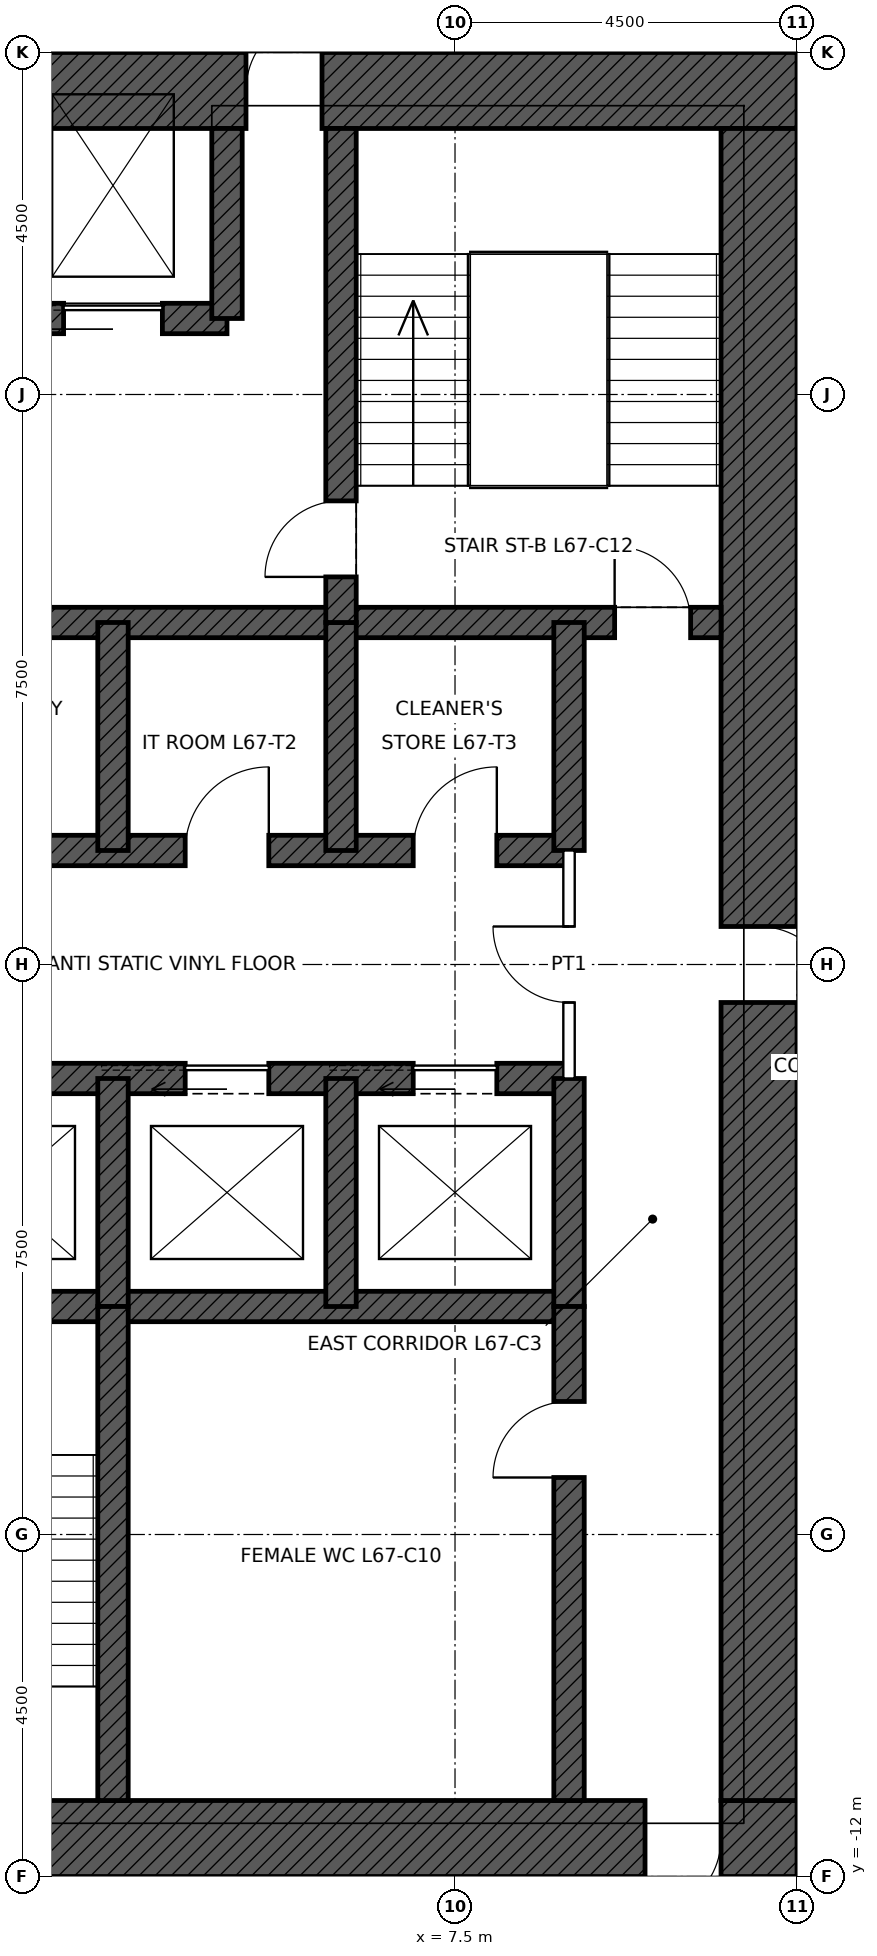
"""IFC4 building model, lengths in metres.
Left out: names, types, materials, properties, quantities, classifications, styles, units other than length and angle.
Written with IfcOpenShell. Run it as: python <this file> out.ifc"""

import sys

from ifc_helpers import new_model, si_unit, direction, frame, frame_2d, origin, place, context, subcontext, project, spatial, rectangle, extrude, element, fill, save


model = new_model("IFC4")
c1 = context("Model", 3, precision=1e-05, world=origin(), true_north=direction((0.0, 1.0)))
c2 = subcontext(c1, "Body", "Model", "MODEL_VIEW")
j1 = project(units=[si_unit("LENGTHUNIT", "METRE"), si_unit("PLANEANGLEUNIT", "RADIAN")], contexts=[c1])
p1 = place(None, origin())
s1 = spatial("IfcSite", under=j1, at=p1, CompositionType="ELEMENT")
p2 = place(p1, origin())
s2 = spatial("IfcBuilding", under=s1, at=p2, CompositionType="ELEMENT")
p3 = place(p2, frame((0.0, 0.0, 303.9)))
s3 = spatial("IfcBuildingStorey", under=s2, at=p3, CompositionType="ELEMENT", Elevation=303.9)
p4 = place(p3, frame((-12.0, 11.5, 0.0), z_axis=(0.0, 0.0, 1.0), x_axis=(1.0, 0.0, 0.0)))
e1 = element("IfcWall", 1, at=p4, inside=s3, PredefinedType="SHEAR", context=c2, shape_type="SweptSolid", body=[
    extrude(rectangle(XDim=24.0, YDim=1.0, at=frame_2d((12.0, 0.0))), origin(), (0.0, 0.0, 1.0), 4.0),
])
p5 = place(p4, frame((6.25, 0.0, 0.0)))
e2 = element("IfcOpeningElement", 2, at=p5, cuts=e1, PredefinedType="OPENING", context=c2, shape_type="SweptSolid", body=[
    extrude(rectangle(XDim=1.0, YDim=2.4, at=frame_2d((0.5, 1.2))), frame((0.0, 0.51, 0.0), z_axis=(0.0, -1.0, 0.0), x_axis=(1.0, 0.0, 0.0)), (0.0, 0.0, 1.0), 1.02),
])
p6 = place(p4, frame((16.75, 0.0, 0.0)))
e3 = element("IfcOpeningElement", 3, at=p6, cuts=e1, PredefinedType="OPENING", context=c2, shape_type="SweptSolid", body=[
    extrude(rectangle(XDim=1.0, YDim=2.4, at=frame_2d((0.5, 1.2))), frame((0.0, 0.51, 0.0), z_axis=(0.0, -1.0, 0.0), x_axis=(1.0, 0.0, 0.0)), (0.0, 0.0, 1.0), 1.02),
])
p7 = place(p3, frame((12.0, -11.5, 0.0), z_axis=(0.0, 0.0, 1.0), x_axis=(-1.0, 0.0, 0.0)))
e4 = element("IfcWall", 4, at=p7, inside=s3, PredefinedType="SHEAR", context=c2, shape_type="SweptSolid", body=[
    extrude(rectangle(XDim=24.0, YDim=1.0, at=frame_2d((12.0, 0.0))), origin(), (0.0, 0.0, 1.0), 4.0),
])
p8 = place(p7, frame((11.5, 0.0, 0.0)))
e5 = element("IfcOpeningElement", 5, at=p8, cuts=e4, PredefinedType="OPENING", context=c2, shape_type="SweptSolid", body=[
    extrude(rectangle(XDim=1.0, YDim=2.1, at=frame_2d((0.5, 1.05))), frame((0.0, 0.51, 0.0), z_axis=(0.0, -1.0, 0.0), x_axis=(1.0, 0.0, 0.0)), (0.0, 0.0, 1.0), 1.02),
])
p9 = place(p7, frame((1.0, 0.0, 0.0)))
e6 = element("IfcOpeningElement", 6, at=p9, cuts=e4, PredefinedType="OPENING", context=c2, shape_type="SweptSolid", body=[
    extrude(rectangle(XDim=1.0, YDim=2.4, at=frame_2d((0.5, 1.2))), frame((0.0, 0.51, 0.0), z_axis=(0.0, -1.0, 0.0), x_axis=(1.0, 0.0, 0.0)), (0.0, 0.0, 1.0), 1.02),
])
p10 = place(p3, frame((11.5, 11.0, 0.0), z_axis=(0.0, 0.0, 1.0), x_axis=(0.0, -1.0, 0.0)))
e7 = element("IfcWall", 7, at=p10, inside=s3, PredefinedType="SHEAR", context=c2, shape_type="SweptSolid", body=[
    extrude(rectangle(XDim=22.0, YDim=1.0, at=frame_2d((11.0, 0.0))), origin(), (0.0, 0.0, 1.0), 4.0),
])
p11 = place(p10, frame((10.5, 0.0, 0.0)))
e8 = element("IfcOpeningElement", 8, at=p11, cuts=e7, PredefinedType="OPENING", context=c2, shape_type="SweptSolid", body=[
    extrude(rectangle(XDim=1.0, YDim=2.4, at=frame_2d((0.5, 1.2))), frame((0.0, 0.51, 0.0), z_axis=(0.0, -1.0, 0.0), x_axis=(1.0, 0.0, 0.0)), (0.0, 0.0, 1.0), 1.02),
])
p12 = place(p3, frame((-11.0, 4.5, 0.0), z_axis=(0.0, 0.0, 1.0), x_axis=(1.0, 0.0, 0.0)))
e9 = element("IfcWall", 9, at=p12, inside=s3, PredefinedType="SHEAR", context=c2, shape_type="SweptSolid", body=[
    extrude(rectangle(XDim=22.0, YDim=0.4, at=frame_2d((11.0, 0.0))), origin(), (0.0, 0.0, 1.0), 4.0),
])
p13 = place(p12, frame((0.4, 0.0, 0.0)))
e10 = element("IfcOpeningElement", 10, at=p13, cuts=e9, PredefinedType="OPENING", context=c2, shape_type="SweptSolid", body=[
    extrude(rectangle(XDim=1.0, YDim=2.1, at=frame_2d((0.5, 1.05))), frame((0.0, 0.21, 0.0), z_axis=(0.0, -1.0, 0.0), x_axis=(1.0, 0.0, 0.0)), (0.0, 0.0, 1.0), 0.42),
])
p14 = place(p12, frame((20.6, 0.0, 0.0)))
e11 = element("IfcOpeningElement", 11, at=p14, cuts=e9, PredefinedType="OPENING", context=c2, shape_type="SweptSolid", body=[
    extrude(rectangle(XDim=1.0, YDim=2.1, at=frame_2d((0.5, 1.05))), frame((0.0, 0.21, 0.0), z_axis=(0.0, -1.0, 0.0), x_axis=(1.0, 0.0, 0.0)), (0.0, 0.0, 1.0), 0.42),
])
p15 = place(p3, frame((-9.0, 1.5, 0.0), z_axis=(0.0, 0.0, 1.0), x_axis=(1.0, 0.0, 0.0)))
e12 = element("IfcWall", 12, at=p15, inside=s3, PredefinedType="SHEAR", context=c2, shape_type="SweptSolid", body=[
    extrude(rectangle(XDim=18.0, YDim=0.4, at=frame_2d((9.0, 0.0))), origin(), (0.0, 0.0, 1.0), 4.0),
])
p16 = place(p15, frame((0.95, 0.0, 0.0)))
e13 = element("IfcOpeningElement", 13, at=p16, cuts=e12, PredefinedType="OPENING", context=c2, shape_type="SweptSolid", body=[
    extrude(rectangle(XDim=1.1, YDim=2.1, at=frame_2d((0.55, 1.05))), frame((0.0, 0.21, 0.0), z_axis=(0.0, -1.0, 0.0), x_axis=(1.0, 0.0, 0.0)), (0.0, 0.0, 1.0), 0.42),
])
p17 = place(p15, frame((3.95, 0.0, 0.0)))
e14 = element("IfcOpeningElement", 14, at=p17, cuts=e12, PredefinedType="OPENING", context=c2, shape_type="SweptSolid", body=[
    extrude(rectangle(XDim=1.1, YDim=2.1, at=frame_2d((0.55, 1.05))), frame((0.0, 0.21, 0.0), z_axis=(0.0, -1.0, 0.0), x_axis=(1.0, 0.0, 0.0)), (0.0, 0.0, 1.0), 0.42),
])
p18 = place(p15, frame((6.95, 0.0, 0.0)))
e15 = element("IfcOpeningElement", 15, at=p18, cuts=e12, PredefinedType="OPENING", context=c2, shape_type="SweptSolid", body=[
    extrude(rectangle(XDim=1.1, YDim=2.1, at=frame_2d((0.55, 1.05))), frame((0.0, 0.21, 0.0), z_axis=(0.0, -1.0, 0.0), x_axis=(1.0, 0.0, 0.0)), (0.0, 0.0, 1.0), 0.42),
])
p19 = place(p15, frame((9.95, 0.0, 0.0)))
e16 = element("IfcOpeningElement", 16, at=p19, cuts=e12, PredefinedType="OPENING", context=c2, shape_type="SweptSolid", body=[
    extrude(rectangle(XDim=1.1, YDim=2.1, at=frame_2d((0.55, 1.05))), frame((0.0, 0.21, 0.0), z_axis=(0.0, -1.0, 0.0), x_axis=(1.0, 0.0, 0.0)), (0.0, 0.0, 1.0), 0.42),
])
p20 = place(p15, frame((12.95, 0.0, 0.0)))
e17 = element("IfcOpeningElement", 17, at=p20, cuts=e12, PredefinedType="OPENING", context=c2, shape_type="SweptSolid", body=[
    extrude(rectangle(XDim=1.1, YDim=2.1, at=frame_2d((0.55, 1.05))), frame((0.0, 0.21, 0.0), z_axis=(0.0, -1.0, 0.0), x_axis=(1.0, 0.0, 0.0)), (0.0, 0.0, 1.0), 0.42),
])
p21 = place(p15, frame((15.95, 0.0, 0.0)))
e18 = element("IfcOpeningElement", 18, at=p21, cuts=e12, PredefinedType="OPENING", context=c2, shape_type="SweptSolid", body=[
    extrude(rectangle(XDim=1.1, YDim=2.1, at=frame_2d((0.55, 1.05))), frame((0.0, 0.21, 0.0), z_axis=(0.0, -1.0, 0.0), x_axis=(1.0, 0.0, 0.0)), (0.0, 0.0, 1.0), 0.42),
])
p22 = place(p3, frame((-9.0, -1.5, 0.0), z_axis=(0.0, 0.0, 1.0), x_axis=(1.0, 0.0, 0.0)))
e19 = element("IfcWall", 19, at=p22, inside=s3, PredefinedType="SHEAR", context=c2, shape_type="SweptSolid", body=[
    extrude(rectangle(XDim=18.0, YDim=0.4, at=frame_2d((9.0, 0.0))), origin(), (0.0, 0.0, 1.0), 4.0),
])
p23 = place(p22, frame((9.95, 0.0, 0.0)))
e20 = element("IfcOpeningElement", 20, at=p23, cuts=e19, PredefinedType="OPENING", context=c2, shape_type="SweptSolid", body=[
    extrude(rectangle(XDim=1.1, YDim=2.1, at=frame_2d((0.55, 1.05))), frame((0.0, 0.21, 0.0), z_axis=(0.0, -1.0, 0.0), x_axis=(1.0, 0.0, 0.0)), (0.0, 0.0, 1.0), 0.42),
])
p24 = place(p22, frame((12.95, 0.0, 0.0)))
e21 = element("IfcOpeningElement", 21, at=p24, cuts=e19, PredefinedType="OPENING", context=c2, shape_type="SweptSolid", body=[
    extrude(rectangle(XDim=1.1, YDim=2.1, at=frame_2d((0.55, 1.05))), frame((0.0, 0.21, 0.0), z_axis=(0.0, -1.0, 0.0), x_axis=(1.0, 0.0, 0.0)), (0.0, 0.0, 1.0), 0.42),
])
p25 = place(p22, frame((15.95, 0.0, 0.0)))
e22 = element("IfcOpeningElement", 22, at=p25, cuts=e19, PredefinedType="OPENING", context=c2, shape_type="SweptSolid", body=[
    extrude(rectangle(XDim=1.1, YDim=2.1, at=frame_2d((0.55, 1.05))), frame((0.0, 0.21, 0.0), z_axis=(0.0, -1.0, 0.0), x_axis=(1.0, 0.0, 0.0)), (0.0, 0.0, 1.0), 0.42),
])
p26 = place(p22, frame((0.95, 0.0, 0.0)))
e23 = element("IfcOpeningElement", 23, at=p26, cuts=e19, PredefinedType="OPENING", context=c2, shape_type="SweptSolid", body=[
    extrude(rectangle(XDim=1.1, YDim=2.1, at=frame_2d((0.55, 1.05))), frame((0.0, 0.21, 0.0), z_axis=(0.0, -1.0, 0.0), x_axis=(1.0, 0.0, 0.0)), (0.0, 0.0, 1.0), 0.42),
])
p27 = place(p22, frame((3.95, 0.0, 0.0)))
e24 = element("IfcOpeningElement", 24, at=p27, cuts=e19, PredefinedType="OPENING", context=c2, shape_type="SweptSolid", body=[
    extrude(rectangle(XDim=1.1, YDim=2.1, at=frame_2d((0.55, 1.05))), frame((0.0, 0.21, 0.0), z_axis=(0.0, -1.0, 0.0), x_axis=(1.0, 0.0, 0.0)), (0.0, 0.0, 1.0), 0.42),
])
p28 = place(p22, frame((6.95, 0.0, 0.0)))
e25 = element("IfcOpeningElement", 25, at=p28, cuts=e19, PredefinedType="OPENING", context=c2, shape_type="SweptSolid", body=[
    extrude(rectangle(XDim=1.1, YDim=2.1, at=frame_2d((0.55, 1.05))), frame((0.0, 0.21, 0.0), z_axis=(0.0, -1.0, 0.0), x_axis=(1.0, 0.0, 0.0)), (0.0, 0.0, 1.0), 0.42),
])
p29 = place(p3, frame((-9.0, -4.5, 0.0), z_axis=(0.0, 0.0, 1.0), x_axis=(1.0, 0.0, 0.0)))
e26 = element("IfcWall", 26, at=p29, inside=s3, PredefinedType="SHEAR", context=c2, shape_type="SweptSolid", body=[
    extrude(rectangle(XDim=18.0, YDim=0.4, at=frame_2d((9.0, 0.0))), origin(), (0.0, 0.0, 1.0), 4.0),
])
p30 = place(p3, frame((-4.5, 8.5, 0.0), z_axis=(0.0, 0.0, 1.0), x_axis=(1.0, 0.0, 0.0)))
e27 = element("IfcWall", 27, at=p30, inside=s3, PredefinedType="SHEAR", context=c2, shape_type="SweptSolid", body=[
    extrude(rectangle(XDim=9.0, YDim=0.4, at=frame_2d((4.5, 0.0))), origin(), (0.0, 0.0, 1.0), 4.0),
])
p31 = place(p30, frame((0.85, 0.0, 0.0)))
e28 = element("IfcOpeningElement", 28, at=p31, cuts=e27, PredefinedType="OPENING", context=c2, shape_type="SweptSolid", body=[
    extrude(rectangle(XDim=1.3, YDim=2.4, at=frame_2d((0.65, 1.2))), frame((0.0, 0.21, 0.0), z_axis=(0.0, -1.0, 0.0), x_axis=(1.0, 0.0, 0.0)), (0.0, 0.0, 1.0), 0.42),
])
p32 = place(p30, frame((6.85, 0.0, 0.0)))
e29 = element("IfcOpeningElement", 29, at=p32, cuts=e27, PredefinedType="OPENING", context=c2, shape_type="SweptSolid", body=[
    extrude(rectangle(XDim=1.3, YDim=2.4, at=frame_2d((0.65, 1.2))), frame((0.0, 0.21, 0.0), z_axis=(0.0, -1.0, 0.0), x_axis=(1.0, 0.0, 0.0)), (0.0, 0.0, 1.0), 0.42),
])
p33 = place(p30, frame((3.85, 0.0, 0.0)))
e30 = element("IfcOpeningElement", 30, at=p33, cuts=e27, PredefinedType="OPENING", context=c2, shape_type="SweptSolid", body=[
    extrude(rectangle(XDim=1.3, YDim=2.4, at=frame_2d((0.65, 1.2))), frame((0.0, 0.21, 0.0), z_axis=(0.0, -1.0, 0.0), x_axis=(1.0, 0.0, 0.0)), (0.0, 0.0, 1.0), 0.42),
])
for number, where, z_axis, x_axis in (
    (31, (9.0, 1.5, 0.0), (0.0, 0.0, 1.0), (0.0, 1.0, 0.0)),
    (32, (9.0, -4.5, 0.0), (0.0, 0.0, 1.0), (0.0, 1.0, 0.0)),
    (33, (3.0, 1.5, 0.0), (0.0, 0.0, 1.0), (0.0, 1.0, 0.0)),
    (34, (6.0, 1.5, 0.0), (0.0, 0.0, 1.0), (0.0, 1.0, 0.0)),
    (35, (3.0, -4.5, 0.0), (0.0, 0.0, 1.0), (0.0, 1.0, 0.0)),
    (36, (6.0, -4.5, 0.0), (0.0, 0.0, 1.0), (0.0, 1.0, 0.0)),
):
    element("IfcWall", number, at=place(p3, frame(where, z_axis=z_axis, x_axis=x_axis)), inside=s3, PredefinedType="SHEAR", context=c2, shape_type="SweptSolid", body=[
        extrude(rectangle(XDim=3.0, YDim=0.4, at=frame_2d((1.5, 0.0))), origin(), (0.0, 0.0, 1.0), 4.0),
    ])
p34 = place(p3, frame((6.0, 4.5, 0.0), z_axis=(0.0, 0.0, 1.0), x_axis=(0.0, 1.0, 0.0)))
e37 = element("IfcWall", 37, at=p34, inside=s3, PredefinedType="SHEAR", context=c2, shape_type="SweptSolid", body=[
    extrude(rectangle(XDim=6.5, YDim=0.4, at=frame_2d((3.25, 0.0))), origin(), (0.0, 0.0, 1.0), 4.0),
])
p35 = place(p34, frame((0.6, 0.0, 0.0)))
e38 = element("IfcOpeningElement", 38, at=p35, cuts=e37, PredefinedType="OPENING", context=c2, shape_type="SweptSolid", body=[
    extrude(rectangle(XDim=1.0, YDim=2.1, at=frame_2d((0.5, 1.05))), frame((0.0, 0.21, 0.0), z_axis=(0.0, -1.0, 0.0), x_axis=(1.0, 0.0, 0.0)), (0.0, 0.0, 1.0), 0.42),
])
p36 = place(p3, frame((4.5, 8.5, 0.0), z_axis=(0.0, 0.0, 1.0), x_axis=(0.0, 1.0, 0.0)))
e39 = element("IfcWall", 39, at=p36, inside=s3, PredefinedType="SHEAR", context=c2, shape_type="SweptSolid", body=[
    extrude(rectangle(XDim=2.5, YDim=0.4, at=frame_2d((1.25, 0.0))), origin(), (0.0, 0.0, 1.0), 4.0),
])
p37 = place(p3, frame((9.0, -11.0, 0.0), z_axis=(0.0, 0.0, 1.0), x_axis=(0.0, 1.0, 0.0)))
e40 = element("IfcWall", 40, at=p37, inside=s3, PredefinedType="SHEAR", context=c2, shape_type="SweptSolid", body=[
    extrude(rectangle(XDim=6.5, YDim=0.4, at=frame_2d((3.25, 0.0))), origin(), (0.0, 0.0, 1.0), 4.0),
])
p38 = place(p37, frame((4.25, 0.0, 0.0)))
e41 = element("IfcOpeningElement", 41, at=p38, cuts=e40, PredefinedType="OPENING", context=c2, shape_type="SweptSolid", body=[
    extrude(rectangle(XDim=1.0, YDim=2.1, at=frame_2d((0.5, 1.05))), frame((0.0, 0.21, 0.0), z_axis=(0.0, -1.0, 0.0), x_axis=(1.0, 0.0, 0.0)), (0.0, 0.0, 1.0), 0.42),
])
p39 = place(p3, frame((3.0, -11.0, 0.0), z_axis=(0.0, 0.0, 1.0), x_axis=(0.0, 1.0, 0.0)))
e42 = element("IfcWall", 42, at=p39, inside=s3, PredefinedType="SHEAR", context=c2, shape_type="SweptSolid", body=[
    extrude(rectangle(XDim=6.5, YDim=0.4, at=frame_2d((3.25, 0.0))), origin(), (0.0, 0.0, 1.0), 4.0),
])
p40 = place(p3, frame((2.5, 12.0, 0.0), z_axis=(0.0, 0.0, 1.0), x_axis=(0.0, 1.0, 0.0)))
e43 = element("IfcWall", 43, at=p40, inside=s3, PredefinedType="PARTITIONING", context=c2, shape_type="SweptSolid", body=[
    extrude(rectangle(XDim=3.55, YDim=0.1, at=frame_2d((1.775, 0.0))), origin(), (0.0, 0.0, 1.0), 3.85),
])
p41 = place(p3, frame((9.0, -1.5, 0.0), z_axis=(0.0, 0.0, 1.0), x_axis=(0.0, 1.0, 0.0)))
e44 = element("IfcWall", 44, at=p41, inside=s3, PredefinedType="PARTITIONING", context=c2, shape_type="SweptSolid", body=[
    extrude(rectangle(XDim=3.0, YDim=0.15, at=frame_2d((1.5, 0.0))), origin(), (0.0, 0.0, 1.0), 3.75),
])
p42 = place(p41, frame((1.0, 0.0, 0.0)))
e45 = element("IfcOpeningElement", 45, at=p42, cuts=e44, PredefinedType="OPENING", context=c2, shape_type="SweptSolid", body=[
    extrude(rectangle(XDim=1.0, YDim=2.4, at=frame_2d((0.5, 1.2))), frame((0.0, 0.085, 0.0), z_axis=(0.0, -1.0, 0.0), x_axis=(1.0, 0.0, 0.0)), (0.0, 0.0, 1.0), 0.17),
])
p43 = place(p14, origin())
e46 = element("IfcDoor", 46, at=p43, inside=s3, OperationType="SINGLE_SWING_LEFT", PredefinedType="DOOR", context=c2, shape_type="SweptSolid", body=[
    extrude(rectangle(XDim=1.0, YDim=2.1, at=frame_2d((0.5, 1.05))), frame((0.0, 0.025, 0.0), z_axis=(0.0, -1.0, 0.0), x_axis=(1.0, 0.0, 0.0)), (0.0, 0.0, 1.0), 0.05),
])
fill(e11, e46)
p44 = place(p35, origin())
e47 = element("IfcDoor", 47, at=p44, inside=s3, OperationType="SINGLE_SWING_LEFT", PredefinedType="DOOR", context=c2, shape_type="SweptSolid", body=[
    extrude(rectangle(XDim=1.0, YDim=2.1, at=frame_2d((0.5, 1.05))), frame((0.0, 0.025, 0.0), z_axis=(0.0, -1.0, 0.0), x_axis=(1.0, 0.0, 0.0)), (0.0, 0.0, 1.0), 0.05),
])
fill(e38, e47)
p45 = place(p6, origin())
e48 = element("IfcDoor", 48, at=p45, inside=s3, OperationType="SINGLE_SWING_RIGHT", PredefinedType="DOOR", context=c2, shape_type="SweptSolid", body=[
    extrude(rectangle(XDim=1.0, YDim=2.4, at=frame_2d((0.5, 1.2))), frame((0.0, 0.485, 0.0), z_axis=(0.0, -1.0, 0.0), x_axis=(1.0, 0.0, 0.0)), (0.0, 0.0, 1.0), 0.05),
])
fill(e3, e48)
p46 = place(p11, origin())
e49 = element("IfcDoor", 49, at=p46, inside=s3, OperationType="SINGLE_SWING_RIGHT", PredefinedType="DOOR", context=c2, shape_type="SweptSolid", body=[
    extrude(rectangle(XDim=1.0, YDim=2.4, at=frame_2d((0.5, 1.2))), frame((0.0, 0.485, 0.0), z_axis=(0.0, -1.0, 0.0), x_axis=(1.0, 0.0, 0.0)), (0.0, 0.0, 1.0), 0.05),
])
fill(e8, e49)
p47 = place(p9, origin())
e50 = element("IfcDoor", 50, at=p47, inside=s3, OperationType="SINGLE_SWING_RIGHT", PredefinedType="DOOR", context=c2, shape_type="SweptSolid", body=[
    extrude(rectangle(XDim=1.0, YDim=2.4, at=frame_2d((0.5, 1.2))), frame((0.0, 0.485, 0.0), z_axis=(0.0, -1.0, 0.0), x_axis=(1.0, 0.0, 0.0)), (0.0, 0.0, 1.0), 0.05),
])
fill(e6, e50)
p48 = place(p38, origin())
e51 = element("IfcDoor", 51, at=p48, inside=s3, OperationType="SINGLE_SWING_LEFT", PredefinedType="DOOR", context=c2, shape_type="SweptSolid", body=[
    extrude(rectangle(XDim=1.0, YDim=2.1, at=frame_2d((0.5, 1.05))), frame((0.0, 0.025, 0.0), z_axis=(0.0, -1.0, 0.0), x_axis=(1.0, 0.0, 0.0)), (0.0, 0.0, 1.0), 0.05),
])
fill(e41, e51)
p49 = place(p32, origin())
e52 = element("IfcDoor", 52, at=p49, inside=s3, OperationType="SLIDING_TO_LEFT", PredefinedType="DOOR", context=c2, shape_type="SweptSolid", body=[
    extrude(rectangle(XDim=1.3, YDim=2.4, at=frame_2d((0.65, 1.2))), frame((0.0, 0.025, 0.0), z_axis=(0.0, -1.0, 0.0), x_axis=(1.0, 0.0, 0.0)), (0.0, 0.0, 1.0), 0.05),
])
fill(e29, e52)
p50 = place(p24, origin())
e53 = element("IfcDoor", 53, at=p50, inside=s3, OperationType="SLIDING_TO_LEFT", PredefinedType="DOOR", context=c2, shape_type="SweptSolid", body=[
    extrude(rectangle(XDim=1.1, YDim=2.1, at=frame_2d((0.55, 1.05))), frame((0.0, 0.025, 0.0), z_axis=(0.0, -1.0, 0.0), x_axis=(1.0, 0.0, 0.0)), (0.0, 0.0, 1.0), 0.05),
])
fill(e21, e53)
p51 = place(p25, origin())
e54 = element("IfcDoor", 54, at=p51, inside=s3, OperationType="SLIDING_TO_LEFT", PredefinedType="DOOR", context=c2, shape_type="SweptSolid", body=[
    extrude(rectangle(XDim=1.1, YDim=2.1, at=frame_2d((0.55, 1.05))), frame((0.0, 0.025, 0.0), z_axis=(0.0, -1.0, 0.0), x_axis=(1.0, 0.0, 0.0)), (0.0, 0.0, 1.0), 0.05),
])
fill(e22, e54)
p52 = place(p42, origin())
e55 = element("IfcDoor", 55, at=p52, inside=s3, OperationType="SINGLE_SWING_RIGHT", PredefinedType="DOOR", context=c2, shape_type="SweptSolid", body=[
    extrude(rectangle(XDim=1.0, YDim=2.4, at=frame_2d((0.5, 1.2))), frame((0.0, 0.025, 0.0), z_axis=(0.0, -1.0, 0.0), x_axis=(1.0, 0.0, 0.0)), (0.0, 0.0, 1.0), 0.05),
])
fill(e45, e55)
p53 = place(p20, origin())
e56 = element("IfcDoor", 56, at=p53, inside=s3, OperationType="SINGLE_SWING_RIGHT", PredefinedType="DOOR", context=c2, shape_type="SweptSolid", body=[
    extrude(rectangle(XDim=1.1, YDim=2.1, at=frame_2d((0.55, 1.05))), frame((0.0, 0.025, 0.0), z_axis=(0.0, -1.0, 0.0), x_axis=(1.0, 0.0, 0.0)), (0.0, 0.0, 1.0), 0.05),
])
fill(e17, e56)
p54 = place(p21, origin())
e57 = element("IfcDoor", 57, at=p54, inside=s3, OperationType="SINGLE_SWING_RIGHT", PredefinedType="DOOR", context=c2, shape_type="SweptSolid", body=[
    extrude(rectangle(XDim=1.1, YDim=2.1, at=frame_2d((0.55, 1.05))), frame((0.0, 0.025, 0.0), z_axis=(0.0, -1.0, 0.0), x_axis=(1.0, 0.0, 0.0)), (0.0, 0.0, 1.0), 0.05),
])
fill(e18, e57)
save(model, sys.argv[1])
